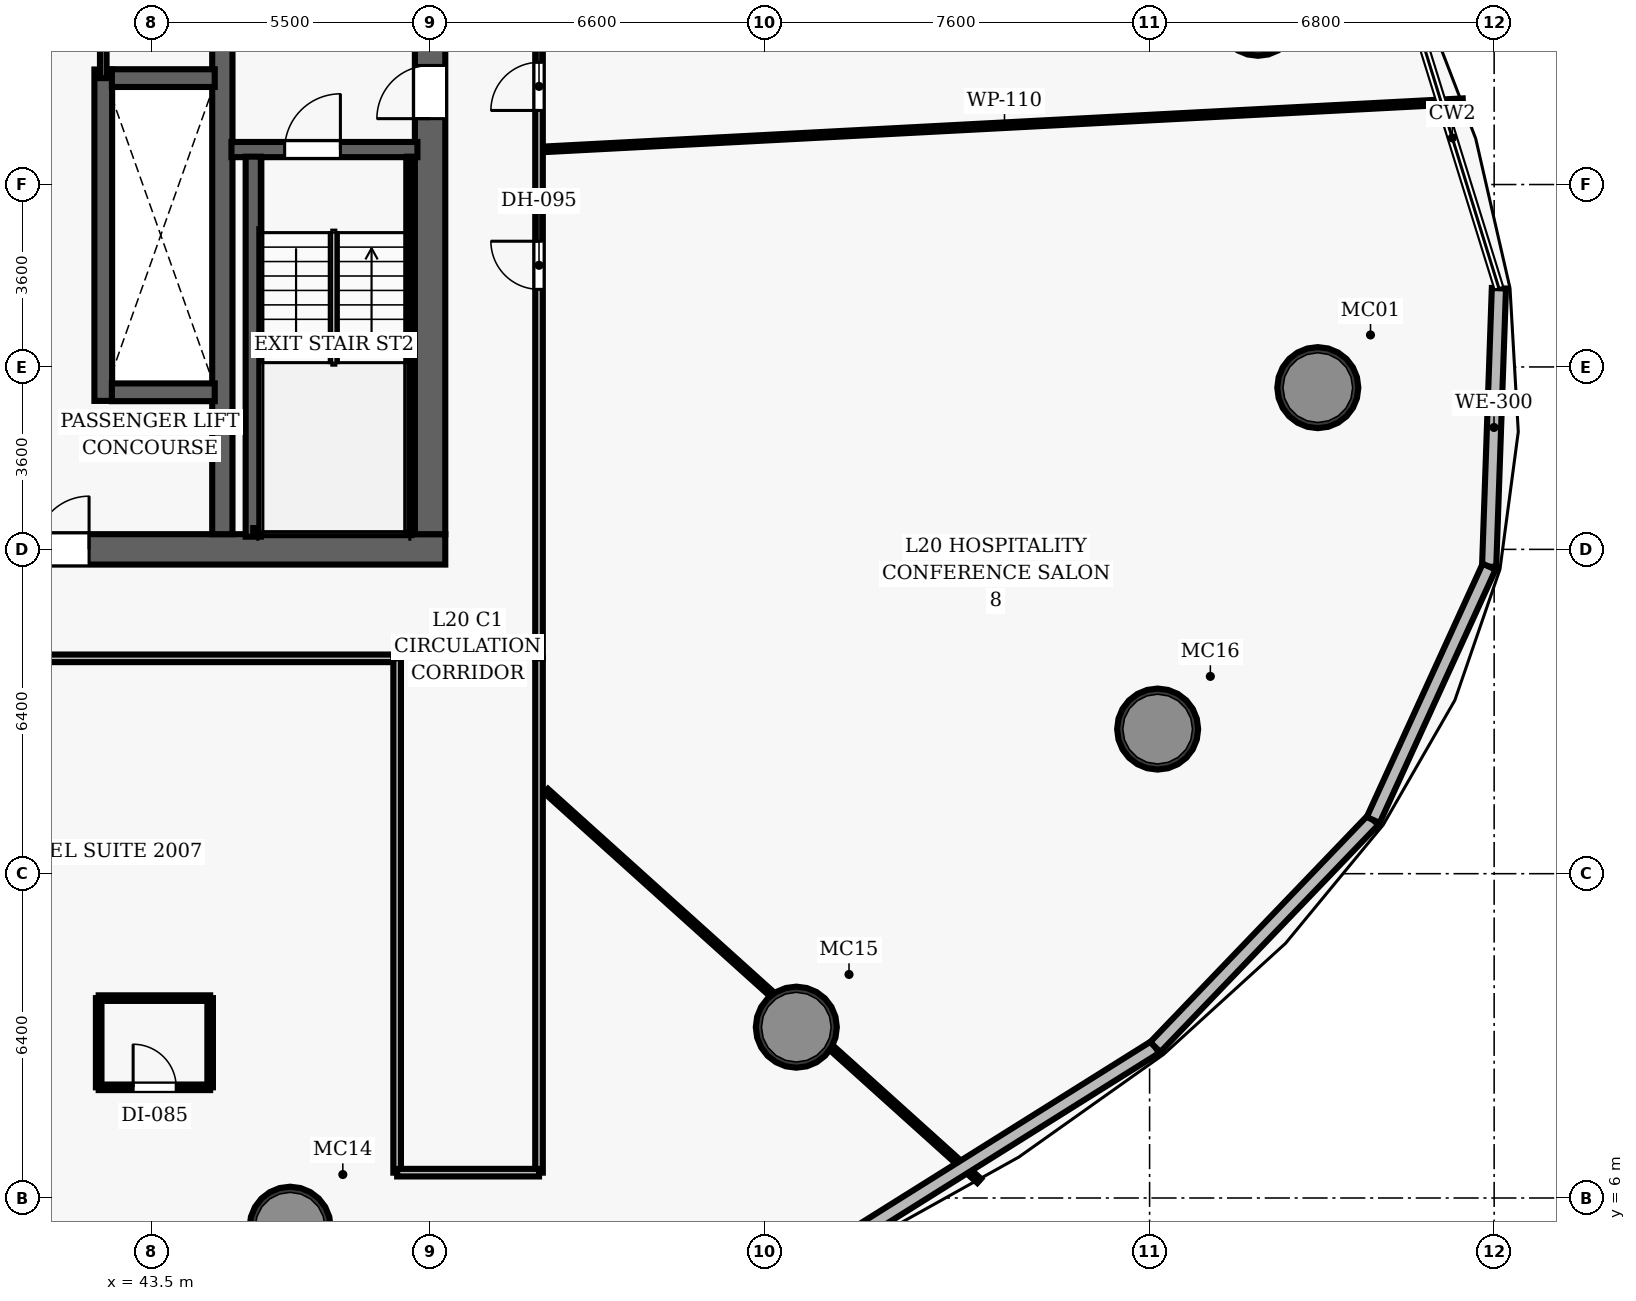
"""IFC4 building model, lengths in metres.
Left out: names, types, materials, properties, quantities, classifications, styles, units other than length and angle.
Written with IfcOpenShell. Run it as: python <this file> out.ifc"""

import sys

from ifc_helpers import new_model, si_unit, direction, frame, frame_2d, origin, origin_2d, place, context, subcontext, project, spatial, rectangle, hollow_circle, extrude, element, fill, save


model = new_model("IFC4")
c1 = context("Model", 3, precision=1e-05, world=origin(), true_north=direction((0.0, 1.0)))
c2 = subcontext(c1, "Body", "Model", "MODEL_VIEW")
j1 = project(units=[si_unit("LENGTHUNIT", "METRE"), si_unit("PLANEANGLEUNIT", "RADIAN")], contexts=[c1])
p1 = place(None, origin())
s1 = spatial("IfcSite", under=j1, at=p1, CompositionType="ELEMENT")
p2 = place(p1, origin())
s2 = spatial("IfcBuilding", under=s1, at=p2, CompositionType="ELEMENT")
p3 = place(p2, frame((0.0, 0.0, 86.9)))
s3 = spatial("IfcBuildingStorey", under=s2, at=p3, CompositionType="ELEMENT", Elevation=86.9)
p4 = place(p3, frame((26.7, 18.8, 0.0), z_axis=(0.0, 0.0, 1.0), x_axis=(1.0, 0.0, 0.0)))
e1 = element("IfcWall", 1, at=p4, inside=s3, PredefinedType="SHEAR", context=c2, shape_type="SweptSolid", body=[
    extrude(rectangle(XDim=22.6, YDim=0.6, at=frame_2d((11.3, 0.0))), origin(), (0.0, 0.0, 1.0), 3.5),
])
p5 = place(p4, frame((14.52, 0.0, 0.0)))
e2 = element("IfcOpeningElement", 2, at=p5, cuts=e1, PredefinedType="OPENING", context=c2, shape_type="SweptSolid", body=[
    extrude(rectangle(XDim=1.05, YDim=2.15, at=frame_2d((0.525, 1.075))), frame((0.0, 0.31, 0.0), z_axis=(0.0, -1.0, 0.0), x_axis=(1.0, 0.0, 0.0)), (0.0, 0.0, 1.0), 0.62),
])
p6 = place(p3, frame((49.0, 19.1, 0.0), z_axis=(0.0, 0.0, 1.0), x_axis=(0.0, 1.0, 0.0)))
e3 = element("IfcWall", 3, at=p6, inside=s3, PredefinedType="SHEAR", context=c2, shape_type="SweptSolid", body=[
    extrude(rectangle(XDim=13.8, YDim=0.6, at=frame_2d((6.9, 0.0))), origin(), (0.0, 0.0, 1.0), 3.5),
])
p7 = place(p6, frame((8.2, 0.0, 0.0)))
e4 = element("IfcOpeningElement", 4, at=p7, cuts=e3, PredefinedType="OPENING", context=c2, shape_type="SweptSolid", body=[
    extrude(rectangle(XDim=1.05, YDim=2.15, at=frame_2d((0.525, 1.075))), frame((0.0, 0.31, 0.0), z_axis=(0.0, -1.0, 0.0), x_axis=(1.0, 0.0, 0.0)), (0.0, 0.0, 1.0), 0.62),
])
p8 = place(p3, frame((44.9, 19.1, 0.0), z_axis=(0.0, 0.0, 1.0), x_axis=(0.0, 1.0, 0.0)))
e5 = element("IfcWall", 5, at=p8, inside=s3, PredefinedType="SHEAR", context=c2, shape_type="SweptSolid", body=[
    extrude(rectangle(XDim=13.8, YDim=0.4, at=frame_2d((6.9, 0.0))), origin(), (0.0, 0.0, 1.0), 3.5),
])
for number, where, z_axis, x_axis in (
    (6, (66.52, 21.992, 0.0), (0.0, 0.0, 1.0), (1.0, 0.0, 0.0)),
    (7, (65.339, 29.34, 0.0), (0.0, 0.0, 1.0), (1.0, 0.0, 0.0)),
    (8, (46.238, 5.423, 0.0), (0.0, 0.0, 1.0), (1.0, 0.0, 0.0)),
    (9, (56.228, 9.371, 0.0), (0.0, 0.0, 1.0), (1.0, 0.0, 0.0)),
    (10, (63.359, 15.254, 0.0), (0.0, 0.0, 1.0), (1.0, 0.0, 0.0)),
):
    element("IfcColumn", number, at=place(p3, frame(where, z_axis=z_axis, x_axis=x_axis)), inside=s3, PredefinedType="COLUMN", context=c2, shape_type="SweptSolid", body=[
        extrude(hollow_circle(Radius=0.8, WallThickness=0.06, at=origin_2d()), origin(), (0.0, 0.0, 1.0), 3.5),
    ])
p9 = place(p3, frame((45.08, 26.69, 0.0), z_axis=(0.0, 0.0, 1.0), x_axis=(1.0, 0.0, 0.0)))
e11 = element("IfcWall", 11, at=p9, inside=s3, PredefinedType="SHEAR", context=c2, shape_type="SweptSolid", body=[
    extrude(rectangle(XDim=3.67, YDim=0.3, at=frame_2d((1.835, 0.0))), origin(), (0.0, 0.0, 1.0), 3.5),
])
p10 = place(p9, frame((1.05, 0.0, 0.0)))
e12 = element("IfcOpeningElement", 12, at=p10, cuts=e11, PredefinedType="OPENING", context=c2, shape_type="SweptSolid", body=[
    extrude(rectangle(XDim=1.1, YDim=2.15, at=frame_2d((0.55, 1.075))), frame((0.0, 0.16, 0.0), z_axis=(0.0, -1.0, 0.0), x_axis=(1.0, 0.0, 0.0)), (0.0, 0.0, 1.0), 0.32),
])
p11 = place(p3, frame((45.51, 19.05, 0.0), z_axis=(0.0, 0.0, 1.0), x_axis=(0.0, 1.0, 0.0)))
e13 = element("IfcWall", 13, at=p11, inside=s3, PredefinedType="SHEAR", context=c2, shape_type="SweptSolid", body=[
    extrude(rectangle(XDim=7.5, YDim=0.3, at=frame_2d((3.75, 0.0))), origin(), (0.0, 0.0, 1.0), 3.5),
])
p12 = place(p3, frame((48.605, 19.1, 0.0), z_axis=(0.0, 0.0, 1.0), x_axis=(0.0, 1.0, 0.0)))
e14 = element("IfcWall", 14, at=p12, inside=s3, PredefinedType="SHEAR", context=c2, shape_type="SweptSolid", body=[
    extrude(rectangle(XDim=7.45, YDim=0.12, at=frame_2d((3.725, 0.0))), origin(), (0.0, 0.0, 1.0), 3.5),
])
p13 = place(p3, frame((45.51, 19.16, 0.0), z_axis=(0.0, 0.0, 1.0), x_axis=(1.0, 0.0, 0.0)))
e15 = element("IfcWall", 15, at=p13, inside=s3, PredefinedType="SHEAR", context=c2, shape_type="SweptSolid", body=[
    extrude(rectangle(XDim=3.095, YDim=0.12, at=frame_2d((1.547, 0.0))), origin(), (0.0, 0.0, 1.0), 3.5),
])
p14 = place(p3, frame((42.55, 21.73, 0.0), z_axis=(0.0, 0.0, 1.0), x_axis=(0.0, 1.0, 0.0)))
e16 = element("IfcWall", 16, at=p14, inside=s3, PredefinedType="SHEAR", context=c2, shape_type="SweptSolid", body=[
    extrude(rectangle(XDim=6.54, YDim=0.35, at=frame_2d((3.27, 0.0))), origin(), (0.0, 0.0, 1.0), 2.6),
])
for number, where, z_axis, x_axis in (
    (17, (42.72, 21.9, 0.0), (0.0, 0.0, 1.0), (1.0, 0.0, 0.0)),
    (18, (42.72, 28.1, 0.0), (0.0, 0.0, 1.0), (1.0, 0.0, 0.0)),
):
    element("IfcWall", number, at=place(p3, frame(where, z_axis=z_axis, x_axis=x_axis)), inside=s3, PredefinedType="SHEAR", context=c2, shape_type="SweptSolid", body=[
        extrude(rectangle(XDim=2.03, YDim=0.35, at=frame_2d((1.015, 0.0))), origin(), (0.0, 0.0, 1.0), 2.6),
    ])
p15 = place(p3, frame((42.55, 28.1, 0.0), z_axis=(0.0, 0.0, 1.0), x_axis=(0.0, 1.0, 0.0)))
e19 = element("IfcWall", 19, at=p15, inside=s3, PredefinedType="PARTITIONING", context=c2, shape_type="SweptSolid", body=[
    extrude(rectangle(XDim=4.75, YDim=0.13, at=frame_2d((2.375, 0.0))), origin(), (0.0, 0.0, 1.0), 2.6),
])
p16 = place(p15, frame((0.55, 0.0, 0.0)))
e20 = element("IfcOpeningElement", 20, at=p16, cuts=e19, PredefinedType="OPENING", context=c2, shape_type="SweptSolid", body=[
    extrude(rectangle(XDim=0.85, YDim=2.1, at=frame_2d((0.425, 1.05))), frame((0.0, 0.075, 0.0), z_axis=(0.0, -1.0, 0.0), x_axis=(1.0, 0.0, 0.0)), (0.0, 0.0, 1.0), 0.15),
])
p17 = place(p15, frame((2.9, 0.0, 0.0)))
e21 = element("IfcOpeningElement", 21, at=p17, cuts=e19, PredefinedType="OPENING", context=c2, shape_type="SweptSolid", body=[
    extrude(rectangle(XDim=0.85, YDim=2.1, at=frame_2d((0.425, 1.05))), frame((0.0, 0.075, 0.0), z_axis=(0.0, -1.0, 0.0), x_axis=(1.0, 0.0, 0.0)), (0.0, 0.0, 1.0), 0.15),
])
p18 = place(p3, frame((24.85, 16.65, 0.0), z_axis=(0.0, 0.0, 1.0), x_axis=(1.0, 0.0, 0.0)))
e22 = element("IfcWall", 22, at=p18, inside=s3, PredefinedType="PARTITIONING", context=c2, shape_type="SweptSolid", body=[
    extrude(rectangle(XDim=23.5, YDim=0.15, at=frame_2d((11.75, 0.0))), origin(), (0.0, 0.0, 1.0), 2.6),
])
p19 = place(p18, frame((11.057, 0.0, 0.0)))
e23 = element("IfcOpeningElement", 23, at=p19, cuts=e22, PredefinedType="OPENING", context=c2, shape_type="SweptSolid", body=[
    extrude(rectangle(XDim=0.95, YDim=2.15, at=frame_2d((0.475, 1.075))), frame((0.0, 0.085, 0.0), z_axis=(0.0, -1.0, 0.0), x_axis=(1.0, 0.0, 0.0)), (0.0, 0.0, 1.0), 0.17),
])
p20 = place(p18, frame((15.413, 0.0, 0.0)))
e24 = element("IfcOpeningElement", 24, at=p20, cuts=e22, PredefinedType="OPENING", context=c2, shape_type="SweptSolid", body=[
    extrude(rectangle(XDim=0.95, YDim=2.15, at=frame_2d((0.475, 1.075))), frame((0.0, 0.085, 0.0), z_axis=(0.0, -1.0, 0.0), x_axis=(1.0, 0.0, 0.0)), (0.0, 0.0, 1.0), 0.17),
])
p21 = place(p3, frame((51.15, 16.65, 0.0), z_axis=(0.0, 0.0, 1.0), x_axis=(0.0, 1.0, 0.0)))
e25 = element("IfcWall", 25, at=p21, inside=s3, PredefinedType="PARTITIONING", context=c2, shape_type="SweptSolid", body=[
    extrude(rectangle(XDim=15.9, YDim=0.15, at=frame_2d((7.95, 0.0))), origin(), (0.0, 0.0, 1.0), 2.6),
])
p22 = place(p21, frame((10.812, 0.0, 0.0)))
e26 = element("IfcOpeningElement", 26, at=p22, cuts=e25, PredefinedType="OPENING", context=c2, shape_type="SweptSolid", body=[
    extrude(rectangle(XDim=0.95, YDim=2.15, at=frame_2d((0.475, 1.075))), frame((0.0, 0.085, 0.0), z_axis=(0.0, -1.0, 0.0), x_axis=(1.0, 0.0, 0.0)), (0.0, 0.0, 1.0), 0.17),
])
p23 = place(p21, frame((7.281, 0.0, 0.0)))
e27 = element("IfcOpeningElement", 27, at=p23, cuts=e25, PredefinedType="OPENING", context=c2, shape_type="SweptSolid", body=[
    extrude(rectangle(XDim=0.95, YDim=2.15, at=frame_2d((0.475, 1.075))), frame((0.0, 0.085, 0.0), z_axis=(0.0, -1.0, 0.0), x_axis=(1.0, 0.0, 0.0)), (0.0, 0.0, 1.0), 0.17),
])
for number, where, z_axis, x_axis in (
    (28, (48.35, 6.5, 0.0), (0.0, 0.0, 1.0), (0.0, 1.0, 0.0)),
    (29, (51.15, 6.5, 0.0), (0.0, 0.0, 1.0), (0.0, 1.0, 0.0)),
):
    element("IfcWall", number, at=place(p3, frame(where, z_axis=z_axis, x_axis=x_axis)), inside=s3, PredefinedType="PARTITIONING", context=c2, shape_type="SweptSolid", body=[
        extrude(rectangle(XDim=10.15, YDim=0.15, at=frame_2d((5.075, 0.0))), origin(), (0.0, 0.0, 1.0), 2.6),
    ])
p24 = place(p3, frame((48.35, 6.5, 0.0), z_axis=(0.0, 0.0, 1.0), x_axis=(1.0, 0.0, 0.0)))
e30 = element("IfcWall", 30, at=p24, inside=s3, PredefinedType="PARTITIONING", context=c2, shape_type="SweptSolid", body=[
    extrude(rectangle(XDim=2.8, YDim=0.15, at=frame_2d((1.4, 0.0))), origin(), (0.0, 0.0, 1.0), 2.6),
])
p25 = place(p3, frame((51.29, 26.697, 0.0), z_axis=(0.0, 0.0, 1.0), x_axis=(0.998629382131, 0.052338868396, 0.0)))
e31 = element("IfcWall", 31, at=p25, inside=s3, PredefinedType="PARTITIONING", context=c2, shape_type="SweptSolid", body=[
    extrude(rectangle(XDim=18.117, YDim=0.11, at=frame_2d((9.059, 0.0))), origin(), (0.0, 0.0, 1.0), 2.6),
])
p26 = place(p3, frame((51.29, 14.034, 0.0), z_axis=(0.0, 0.0, 1.0), x_axis=(0.74313790917, -0.669138287616, 0.0)))
e32 = element("IfcWall", 32, at=p26, inside=s3, PredefinedType="PARTITIONING", context=c2, shape_type="SweptSolid", body=[
    extrude(rectangle(XDim=11.501, YDim=0.11, at=frame_2d((5.75, 0.0))), origin(), (0.0, 0.0, 1.0), 2.6),
])
p27 = place(p3, frame((42.46, 8.184, 0.0), z_axis=(0.0, 0.0, 1.0), x_axis=(1.0, 0.0, 0.0)))
e33 = element("IfcWall", 33, at=p27, inside=s3, PredefinedType="PARTITIONING", context=c2, shape_type="SweptSolid", body=[
    extrude(rectangle(XDim=2.2, YDim=0.11, at=frame_2d((1.1, 0.0))), origin(), (0.0, 0.0, 1.0), 2.6),
])
p28 = place(p27, frame((0.68, 0.0, 0.0)))
e34 = element("IfcOpeningElement", 34, at=p28, cuts=e33, PredefinedType="OPENING", context=c2, shape_type="SweptSolid", body=[
    extrude(rectangle(XDim=0.85, YDim=2.1, at=frame_2d((0.425, 1.05))), frame((0.0, 0.065, 0.0), z_axis=(0.0, -1.0, 0.0), x_axis=(1.0, 0.0, 0.0)), (0.0, 0.0, 1.0), 0.13),
])
p29 = place(p3, frame((42.46, 9.944, 0.0), z_axis=(0.0, 0.0, 1.0), x_axis=(1.0, 0.0, 0.0)))
e35 = element("IfcWall", 35, at=p29, inside=s3, PredefinedType="PARTITIONING", context=c2, shape_type="SweptSolid", body=[
    extrude(rectangle(XDim=2.2, YDim=0.11, at=frame_2d((1.1, 0.0))), origin(), (0.0, 0.0, 1.0), 2.6),
])
for number, where, z_axis, x_axis in (
    (36, (42.46, 8.184, 0.0), (0.0, 0.0, 1.0), (0.0, 1.0, 0.0)),
    (37, (44.66, 8.184, 0.0), (0.0, 0.0, 1.0), (0.0, 1.0, 0.0)),
):
    element("IfcWall", number, at=place(p3, frame(where, z_axis=z_axis, x_axis=x_axis)), inside=s3, PredefinedType="PARTITIONING", context=c2, shape_type="SweptSolid", body=[
        extrude(rectangle(XDim=1.76, YDim=0.11, at=frame_2d((0.88, 0.0))), origin(), (0.0, 0.0, 1.0), 2.6),
    ])
p30 = place(p3, frame((70.094, 23.953, 0.0), z_axis=(0.0, 0.0, 1.0), x_axis=(-0.035084816569, -0.999384338303, 0.0)))
e38 = element("IfcWall", 38, at=p30, inside=s3, PredefinedType="SOLIDWALL", context=c2, shape_type="SweptSolid", body=[
    extrude(rectangle(XDim=5.497, YDim=0.28, at=frame_2d((2.749, 0.0))), origin(), (0.0, 0.0, 1.0), 3.25),
])
p31 = place(p3, frame((63.312, 8.978, 0.0), z_axis=(0.0, 0.0, 1.0), x_axis=(-0.847464048159, -0.530852792287, 0.0)))
e39 = element("IfcWall", 39, at=p31, inside=s3, PredefinedType="SOLIDWALL", context=c2, shape_type="SweptSolid", body=[
    extrude(rectangle(XDim=7.143, YDim=0.28, at=frame_2d((3.571, 0.0))), origin(), (0.0, 0.0, 1.0), 3.25),
])
p32 = place(p3, frame((67.613, 13.46, 0.0), z_axis=(0.0, 0.0, 1.0), x_axis=(-0.692415648775, -0.721498835294, 0.0)))
e40 = element("IfcWall", 40, at=p32, inside=s3, PredefinedType="SOLIDWALL", context=c2, shape_type="SweptSolid", body=[
    extrude(rectangle(XDim=6.212, YDim=0.28, at=frame_2d((3.106, 0.0))), origin(), (0.0, 0.0, 1.0), 3.25),
])
p33 = place(p3, frame((69.901, 18.459, 0.0), z_axis=(0.0, 0.0, 1.0), x_axis=(-0.416110261885, -0.909314164606, 0.0)))
e41 = element("IfcWall", 41, at=p33, inside=s3, PredefinedType="SOLIDWALL", context=c2, shape_type="SweptSolid", body=[
    extrude(rectangle(XDim=5.498, YDim=0.28, at=frame_2d((2.749, 0.0))), origin(), (0.0, 0.0, 1.0), 3.25),
])
p34 = place(p10, origin())
e42 = element("IfcDoor", 42, at=p34, inside=s3, OperationType="SINGLE_SWING_RIGHT", PredefinedType="DOOR", context=c2, shape_type="SweptSolid", body=[
    extrude(rectangle(XDim=1.1, YDim=2.15, at=frame_2d((0.55, 1.075))), frame((0.0, 0.025, 0.0), z_axis=(0.0, -1.0, 0.0), x_axis=(1.0, 0.0, 0.0)), (0.0, 0.0, 1.0), 0.05),
])
fill(e12, e42)
p35 = place(p7, origin())
e43 = element("IfcDoor", 43, at=p35, inside=s3, OperationType="SINGLE_SWING_LEFT", PredefinedType="DOOR", context=c2, shape_type="SweptSolid", body=[
    extrude(rectangle(XDim=1.05, YDim=2.15, at=frame_2d((0.525, 1.075))), frame((0.0, 0.025, 0.0), z_axis=(0.0, -1.0, 0.0), x_axis=(1.0, 0.0, 0.0)), (0.0, 0.0, 1.0), 0.05),
])
fill(e4, e43)
p36 = place(p5, origin())
e44 = element("IfcDoor", 44, at=p36, inside=s3, OperationType="SINGLE_SWING_RIGHT", PredefinedType="DOOR", context=c2, shape_type="SweptSolid", body=[
    extrude(rectangle(XDim=1.05, YDim=2.15, at=frame_2d((0.525, 1.075))), frame((0.0, 0.025, 0.0), z_axis=(0.0, -1.0, 0.0), x_axis=(1.0, 0.0, 0.0)), (0.0, 0.0, 1.0), 0.05),
])
fill(e2, e44)
p37 = place(p22, origin())
e45 = element("IfcDoor", 45, at=p37, inside=s3, OperationType="SINGLE_SWING_LEFT", PredefinedType="DOOR", context=c2, shape_type="SweptSolid", body=[
    extrude(rectangle(XDim=0.95, YDim=2.15, at=frame_2d((0.475, 1.075))), frame((0.0, 0.025, 0.0), z_axis=(0.0, -1.0, 0.0), x_axis=(1.0, 0.0, 0.0)), (0.0, 0.0, 1.0), 0.05),
])
fill(e26, e45)
p38 = place(p28, origin())
e46 = element("IfcDoor", 46, at=p38, inside=s3, OperationType="SINGLE_SWING_LEFT", PredefinedType="DOOR", context=c2, shape_type="SweptSolid", body=[
    extrude(rectangle(XDim=0.85, YDim=2.1, at=frame_2d((0.425, 1.05))), frame((0.0, 0.025, 0.0), z_axis=(0.0, -1.0, 0.0), x_axis=(1.0, 0.0, 0.0)), (0.0, 0.0, 1.0), 0.05),
])
fill(e34, e46)
p39 = place(p23, origin())
e47 = element("IfcDoor", 47, at=p39, inside=s3, OperationType="SINGLE_SWING_RIGHT", PredefinedType="DOOR", context=c2, shape_type="SweptSolid", body=[
    extrude(rectangle(XDim=0.95, YDim=2.15, at=frame_2d((0.475, 1.075))), frame((0.0, 0.025, 0.0), z_axis=(0.0, -1.0, 0.0), x_axis=(1.0, 0.0, 0.0)), (0.0, 0.0, 1.0), 0.05),
])
fill(e27, e47)
save(model, sys.argv[1])
